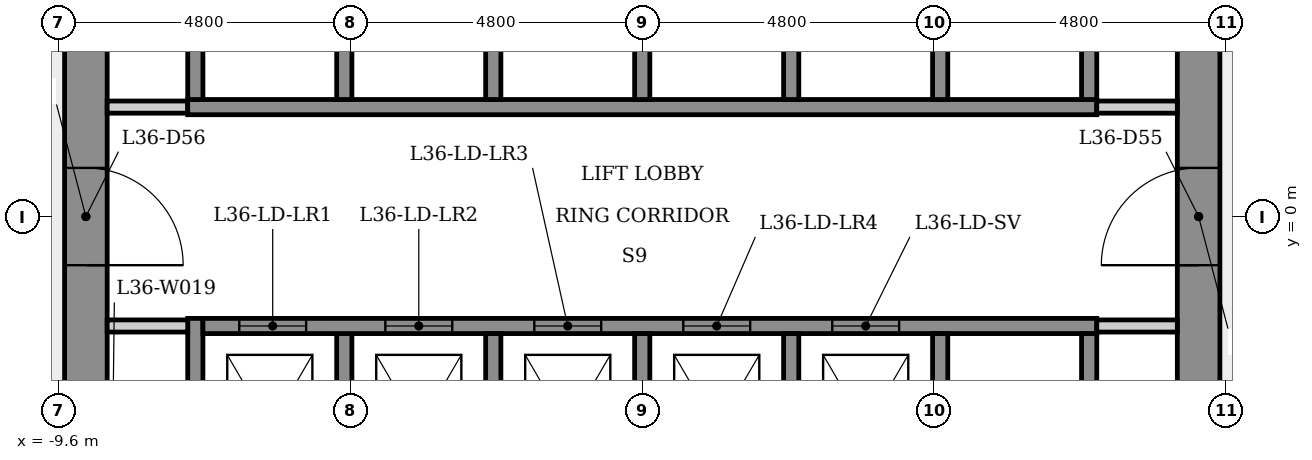
"""IFC4 building model, lengths in metres.
Left out: names, types, materials, properties, quantities, classifications, styles, units other than length and angle.
Written with IfcOpenShell. Run it as: python <this file> out.ifc"""

import sys

from ifc_helpers import new_model, si_unit, direction, frame, frame_2d, origin, place, context, subcontext, project, spatial, rectangle, extrude, element, fill, save


model = new_model("IFC4")
c1 = context("Model", 3, precision=1e-05, world=origin(), true_north=direction((0.0, 1.0)))
c2 = subcontext(c1, "Body", "Model", "MODEL_VIEW")
j1 = project(units=[si_unit("LENGTHUNIT", "METRE"), si_unit("PLANEANGLEUNIT", "RADIAN")], contexts=[c1])
p1 = place(None, origin())
s1 = spatial("IfcSite", under=j1, at=p1, CompositionType="ELEMENT")
p2 = place(p1, origin())
s2 = spatial("IfcBuilding", under=s1, at=p2, CompositionType="ELEMENT")
p3 = place(p2, frame((0.0, 0.0, 135.9)))
s3 = spatial("IfcBuildingStorey", under=s2, at=p3, CompositionType="ELEMENT", Elevation=135.9)
p4 = place(p3, frame((9.15, -5.485, 0.0), z_axis=(0.0, 0.0, 1.0), x_axis=(0.0, 1.0, 0.0)))
e1 = element("IfcWall", 1, at=p4, inside=s3, PredefinedType="SHEAR", context=c2, shape_type="SweptSolid", body=[
    extrude(rectangle(XDim=10.97, YDim=0.7, at=frame_2d((5.485, 0.0))), origin(), (0.0, 0.0, 1.0), 4.0),
])
p5 = place(p4, frame((4.685, 0.0, 0.0)))
e2 = element("IfcOpeningElement", 2, at=p5, cuts=e1, PredefinedType="OPENING", context=c2, shape_type="SweptSolid", body=[
    extrude(rectangle(XDim=1.6, YDim=2.1, at=frame_2d((0.8, 1.05))), frame((0.0, 0.36, 0.0), z_axis=(0.0, -1.0, 0.0), x_axis=(1.0, 0.0, 0.0)), (0.0, 0.0, 1.0), 0.72),
])
p6 = place(p3, frame((-9.15, 5.485, 0.0), z_axis=(0.0, 0.0, 1.0), x_axis=(0.0, -1.0, 0.0)))
e3 = element("IfcWall", 3, at=p6, inside=s3, PredefinedType="SHEAR", context=c2, shape_type="SweptSolid", body=[
    extrude(rectangle(XDim=10.97, YDim=0.7, at=frame_2d((5.485, 0.0))), origin(), (0.0, 0.0, 1.0), 4.0),
])
p7 = place(p6, frame((4.685, 0.0, 0.0)))
e4 = element("IfcOpeningElement", 4, at=p7, cuts=e3, PredefinedType="OPENING", context=c2, shape_type="SweptSolid", body=[
    extrude(rectangle(XDim=1.6, YDim=2.1, at=frame_2d((0.8, 1.05))), frame((0.0, 0.36, 0.0), z_axis=(0.0, -1.0, 0.0), x_axis=(1.0, 0.0, 0.0)), (0.0, 0.0, 1.0), 0.72),
])
p8 = place(p3, frame((-8.8, 1.8, 0.0), z_axis=(0.0, 0.0, 1.0), x_axis=(1.0, 0.0, 0.0)))
e5 = element("IfcWall", 5, at=p8, inside=s3, PredefinedType="PARTITIONING", context=c2, shape_type="SweptSolid", body=[
    extrude(rectangle(XDim=1.325, YDim=0.2, at=frame_2d((0.663, 0.0))), origin(), (0.0, 0.0, 1.0), 3.6),
])
p9 = place(p3, frame((-7.475, 1.8, 0.0), z_axis=(0.0, 0.0, 1.0), x_axis=(1.0, 0.0, 0.0)))
e6 = element("IfcWall", 6, at=p9, inside=s3, PredefinedType="SHEAR", context=c2, shape_type="SweptSolid", body=[
    extrude(rectangle(XDim=14.95, YDim=0.25, at=frame_2d((7.475, 0.0))), origin(), (0.0, 0.0, 1.0), 3.6),
])
p10 = place(p3, frame((-7.35, -5.846, 0.0), z_axis=(0.0, 0.0, 1.0), x_axis=(0.0, 1.0, 0.0)))
e7 = element("IfcWall", 7, at=p10, inside=s3, PredefinedType="SHEAR", context=c2, shape_type="SweptSolid", body=[
    extrude(rectangle(XDim=4.171, YDim=0.25, at=frame_2d((2.085, 0.0))), origin(), (0.0, 0.0, 1.0), 3.6),
])
p11 = place(p3, frame((-7.35, 1.925, 0.0), z_axis=(0.0, 0.0, 1.0), x_axis=(0.0, 1.0, 0.0)))
e8 = element("IfcWall", 8, at=p11, inside=s3, PredefinedType="SHEAR", context=c2, shape_type="SweptSolid", body=[
    extrude(rectangle(XDim=3.921, YDim=0.25, at=frame_2d((1.96, 0.0))), origin(), (0.0, 0.0, 1.0), 3.6),
])
p12 = place(p3, frame((-7.475, -1.8, 0.0), z_axis=(0.0, 0.0, 1.0), x_axis=(-1.0, 0.0, 0.0)))
e9 = element("IfcWall", 9, at=p12, inside=s3, PredefinedType="PARTITIONING", context=c2, shape_type="SweptSolid", body=[
    extrude(rectangle(XDim=1.325, YDim=0.2, at=frame_2d((0.663, 0.0))), origin(), (0.0, 0.0, 1.0), 3.6),
])
for number, where, z_axis, x_axis in (
    (10, (-4.9, -1.925, 0.0), (0.0, 0.0, 1.0), (0.0, -1.0, 0.0)),
    (11, (-4.9, 5.025, 0.0), (0.0, 0.0, 1.0), (0.0, -1.0, 0.0)),
):
    element("IfcWall", number, at=place(p3, frame(where, z_axis=z_axis, x_axis=x_axis)), inside=s3, PredefinedType="SHEAR", context=c2, shape_type="SweptSolid", body=[
        extrude(rectangle(XDim=3.1, YDim=0.25, at=frame_2d((1.55, 0.0))), origin(), (0.0, 0.0, 1.0), 4.0),
    ])
p13 = place(p3, frame((-7.225, -1.8, 0.0), z_axis=(0.0, 0.0, 1.0), x_axis=(1.0, 0.0, 0.0)))
e12 = element("IfcWall", 12, at=p13, inside=s3, PredefinedType="SHEAR", context=c2, shape_type="SweptSolid", body=[
    extrude(rectangle(XDim=14.7, YDim=0.25, at=frame_2d((7.35, 0.0))), origin(), (0.0, 0.0, 1.0), 3.6),
])
p14 = place(p13, frame((0.597, 0.0, 0.0)))
e13 = element("IfcOpeningElement", 13, at=p14, cuts=e12, PredefinedType="OPENING", context=c2, shape_type="SweptSolid", body=[
    extrude(rectangle(XDim=1.1, YDim=2.1, at=frame_2d((0.55, 1.05))), frame((0.0, 0.135, 0.0), z_axis=(0.0, -1.0, 0.0), x_axis=(1.0, 0.0, 0.0)), (0.0, 0.0, 1.0), 0.27),
])
p15 = place(p13, frame((3.0, 0.0, 0.0)))
e14 = element("IfcOpeningElement", 14, at=p15, cuts=e12, PredefinedType="OPENING", context=c2, shape_type="SweptSolid", body=[
    extrude(rectangle(XDim=1.1, YDim=2.1, at=frame_2d((0.55, 1.05))), frame((0.0, 0.135, 0.0), z_axis=(0.0, -1.0, 0.0), x_axis=(1.0, 0.0, 0.0)), (0.0, 0.0, 1.0), 0.27),
])
p16 = place(p13, frame((5.45, 0.0, 0.0)))
e15 = element("IfcOpeningElement", 15, at=p16, cuts=e12, PredefinedType="OPENING", context=c2, shape_type="SweptSolid", body=[
    extrude(rectangle(XDim=1.1, YDim=2.1, at=frame_2d((0.55, 1.05))), frame((0.0, 0.135, 0.0), z_axis=(0.0, -1.0, 0.0), x_axis=(1.0, 0.0, 0.0)), (0.0, 0.0, 1.0), 0.27),
])
p17 = place(p13, frame((7.9, 0.0, 0.0)))
e16 = element("IfcOpeningElement", 16, at=p17, cuts=e12, PredefinedType="OPENING", context=c2, shape_type="SweptSolid", body=[
    extrude(rectangle(XDim=1.1, YDim=2.1, at=frame_2d((0.55, 1.05))), frame((0.0, 0.135, 0.0), z_axis=(0.0, -1.0, 0.0), x_axis=(1.0, 0.0, 0.0)), (0.0, 0.0, 1.0), 0.27),
])
p18 = place(p13, frame((10.35, 0.0, 0.0)))
e17 = element("IfcOpeningElement", 17, at=p18, cuts=e12, PredefinedType="OPENING", context=c2, shape_type="SweptSolid", body=[
    extrude(rectangle(XDim=1.1, YDim=2.1, at=frame_2d((0.55, 1.05))), frame((0.0, 0.135, 0.0), z_axis=(0.0, -1.0, 0.0), x_axis=(1.0, 0.0, 0.0)), (0.0, 0.0, 1.0), 0.27),
])
for number, where, z_axis, x_axis in (
    (18, (-2.45, -1.925, 0.0), (0.0, 0.0, 1.0), (0.0, -1.0, 0.0)),
    (19, (-2.45, 5.025, 0.0), (0.0, 0.0, 1.0), (0.0, -1.0, 0.0)),
    (20, (0.0, -1.925, 0.0), (0.0, 0.0, 1.0), (0.0, -1.0, 0.0)),
    (21, (0.0, 5.025, 0.0), (0.0, 0.0, 1.0), (0.0, -1.0, 0.0)),
    (22, (2.45, -1.925, 0.0), (0.0, 0.0, 1.0), (0.0, -1.0, 0.0)),
    (23, (2.45, 5.025, 0.0), (0.0, 0.0, 1.0), (0.0, -1.0, 0.0)),
    (24, (4.9, -1.925, 0.0), (0.0, 0.0, 1.0), (0.0, -1.0, 0.0)),
    (25, (4.9, 5.025, 0.0), (0.0, 0.0, 1.0), (0.0, -1.0, 0.0)),
):
    element("IfcWall", number, at=place(p3, frame(where, z_axis=z_axis, x_axis=x_axis)), inside=s3, PredefinedType="SHEAR", context=c2, shape_type="SweptSolid", body=[
        extrude(rectangle(XDim=3.1, YDim=0.25, at=frame_2d((1.55, 0.0))), origin(), (0.0, 0.0, 1.0), 4.0),
    ])
p19 = place(p3, frame((7.475, 1.8, 0.0), z_axis=(0.0, 0.0, 1.0), x_axis=(1.0, 0.0, 0.0)))
e26 = element("IfcWall", 26, at=p19, inside=s3, PredefinedType="PARTITIONING", context=c2, shape_type="SweptSolid", body=[
    extrude(rectangle(XDim=1.325, YDim=0.2, at=frame_2d((0.663, 0.0))), origin(), (0.0, 0.0, 1.0), 3.6),
])
for number, where, z_axis, x_axis in (
    (27, (7.35, -1.925, 0.0), (0.0, 0.0, 1.0), (0.0, -1.0, 0.0)),
    (28, (7.35, 5.025, 0.0), (0.0, 0.0, 1.0), (0.0, -1.0, 0.0)),
):
    element("IfcWall", number, at=place(p3, frame(where, z_axis=z_axis, x_axis=x_axis)), inside=s3, PredefinedType="SHEAR", context=c2, shape_type="SweptSolid", body=[
        extrude(rectangle(XDim=3.1, YDim=0.25, at=frame_2d((1.55, 0.0))), origin(), (0.0, 0.0, 1.0), 4.0),
    ])
p20 = place(p3, frame((8.8, -1.8, 0.0), z_axis=(0.0, 0.0, 1.0), x_axis=(-1.0, 0.0, 0.0)))
e29 = element("IfcWall", 29, at=p20, inside=s3, PredefinedType="PARTITIONING", context=c2, shape_type="SweptSolid", body=[
    extrude(rectangle(XDim=1.325, YDim=0.2, at=frame_2d((0.663, 0.0))), origin(), (0.0, 0.0, 1.0), 3.6),
])
p21 = place(p14, origin())
e30 = element("IfcDoor", 30, at=p21, inside=s3, OperationType="SLIDING_TO_LEFT", PredefinedType="DOOR", context=c2, shape_type="SweptSolid", body=[
    extrude(rectangle(XDim=1.1, YDim=2.1, at=frame_2d((0.55, 1.05))), frame((0.0, 0.025, 0.0), z_axis=(0.0, -1.0, 0.0), x_axis=(1.0, 0.0, 0.0)), (0.0, 0.0, 1.0), 0.05),
])
fill(e13, e30)
p22 = place(p15, origin())
e31 = element("IfcDoor", 31, at=p22, inside=s3, OperationType="SLIDING_TO_LEFT", PredefinedType="DOOR", context=c2, shape_type="SweptSolid", body=[
    extrude(rectangle(XDim=1.1, YDim=2.1, at=frame_2d((0.55, 1.05))), frame((0.0, 0.025, 0.0), z_axis=(0.0, -1.0, 0.0), x_axis=(1.0, 0.0, 0.0)), (0.0, 0.0, 1.0), 0.05),
])
fill(e14, e31)
p23 = place(p16, origin())
e32 = element("IfcDoor", 32, at=p23, inside=s3, OperationType="SLIDING_TO_LEFT", PredefinedType="DOOR", context=c2, shape_type="SweptSolid", body=[
    extrude(rectangle(XDim=1.1, YDim=2.1, at=frame_2d((0.55, 1.05))), frame((0.0, 0.025, 0.0), z_axis=(0.0, -1.0, 0.0), x_axis=(1.0, 0.0, 0.0)), (0.0, 0.0, 1.0), 0.05),
])
fill(e15, e32)
p24 = place(p17, origin())
e33 = element("IfcDoor", 33, at=p24, inside=s3, OperationType="SLIDING_TO_LEFT", PredefinedType="DOOR", context=c2, shape_type="SweptSolid", body=[
    extrude(rectangle(XDim=1.1, YDim=2.1, at=frame_2d((0.55, 1.05))), frame((0.0, 0.025, 0.0), z_axis=(0.0, -1.0, 0.0), x_axis=(1.0, 0.0, 0.0)), (0.0, 0.0, 1.0), 0.05),
])
fill(e16, e33)
p25 = place(p18, origin())
e34 = element("IfcDoor", 34, at=p25, inside=s3, OperationType="SLIDING_TO_LEFT", PredefinedType="DOOR", context=c2, shape_type="SweptSolid", body=[
    extrude(rectangle(XDim=1.1, YDim=2.1, at=frame_2d((0.55, 1.05))), frame((0.0, 0.025, 0.0), z_axis=(0.0, -1.0, 0.0), x_axis=(1.0, 0.0, 0.0)), (0.0, 0.0, 1.0), 0.05),
])
fill(e17, e34)
p26 = place(p5, origin())
e35 = element("IfcDoor", 35, at=p26, inside=s3, OperationType="SINGLE_SWING_LEFT", PredefinedType="DOOR", context=c2, shape_type="SweptSolid", body=[
    extrude(rectangle(XDim=1.6, YDim=2.1, at=frame_2d((0.8, 1.05))), frame((0.0, 0.025, 0.0), z_axis=(0.0, -1.0, 0.0), x_axis=(1.0, 0.0, 0.0)), (0.0, 0.0, 1.0), 0.05),
])
fill(e2, e35)
p27 = place(p7, origin())
e36 = element("IfcDoor", 36, at=p27, inside=s3, OperationType="SINGLE_SWING_RIGHT", PredefinedType="DOOR", context=c2, shape_type="SweptSolid", body=[
    extrude(rectangle(XDim=1.6, YDim=2.1, at=frame_2d((0.8, 1.05))), frame((0.0, 0.025, 0.0), z_axis=(0.0, -1.0, 0.0), x_axis=(1.0, 0.0, 0.0)), (0.0, 0.0, 1.0), 0.05),
])
fill(e4, e36)
save(model, sys.argv[1])
